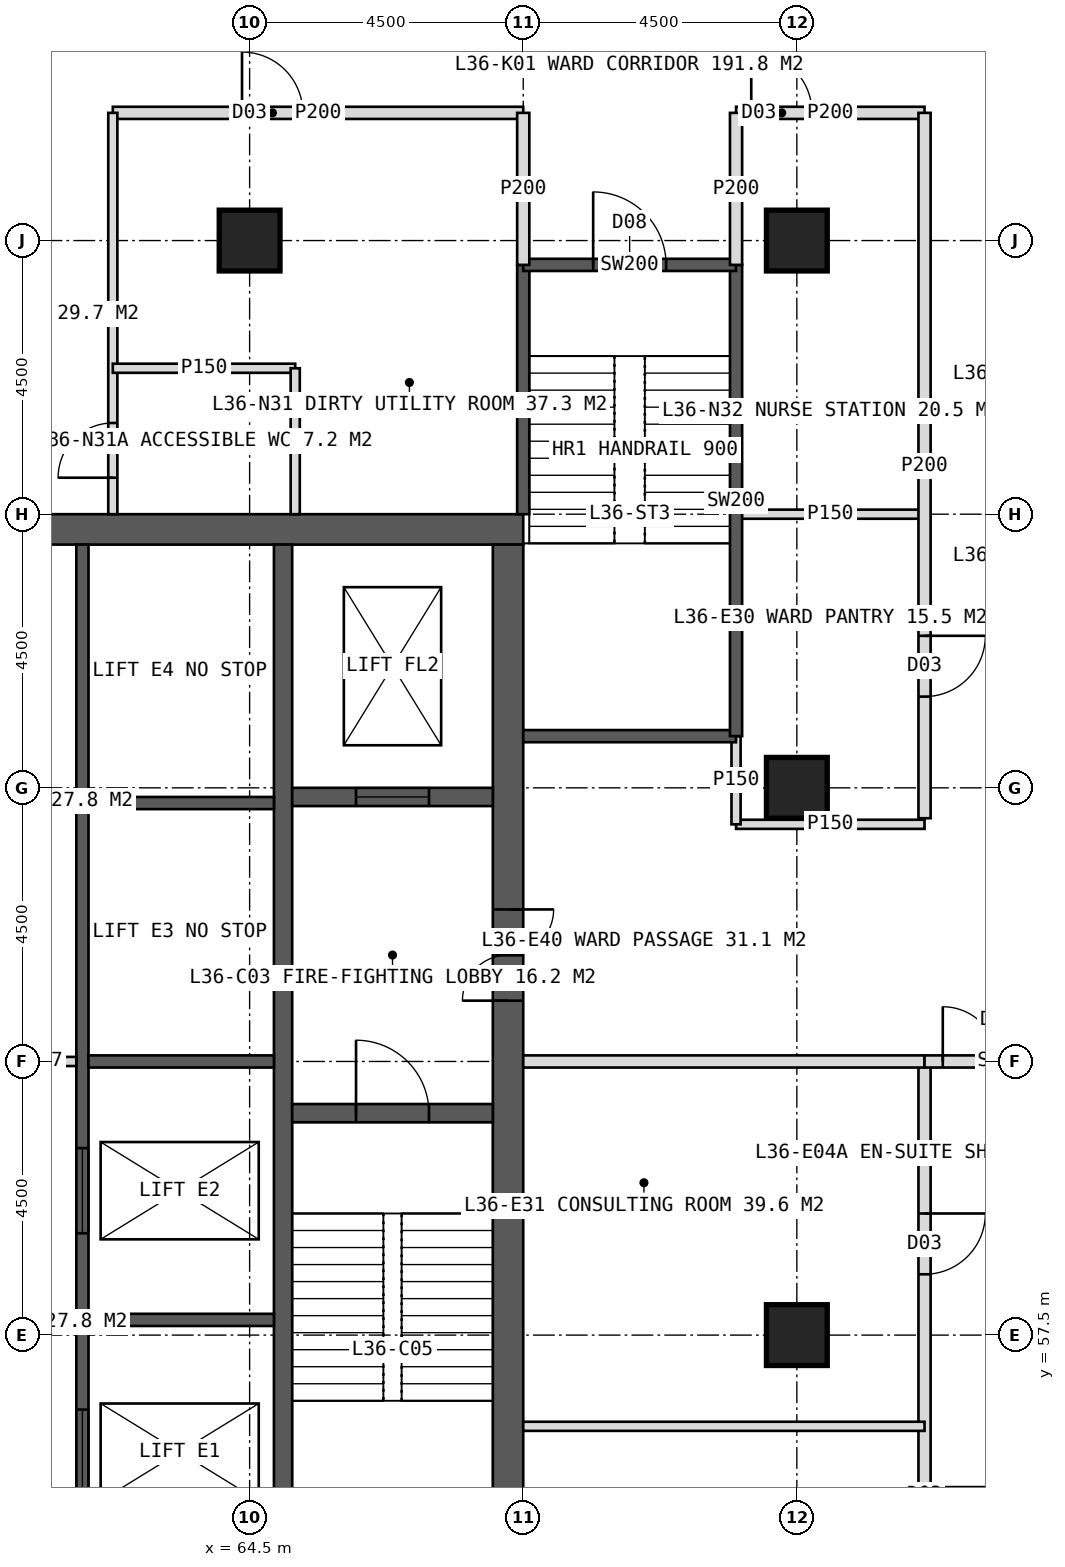
"""IFC4 building model, lengths in metres.
Left out: names, types, materials, properties, quantities, classifications, styles, units other than length and angle.
Written with IfcOpenShell. Run it as: python <this file> out.ifc"""

import sys

from ifc_helpers import new_model, si_unit, direction, frame, frame_2d, origin, origin_2d, place, context, subcontext, project, spatial, rectangle, hollow_rectangle, extrude, element, fill, save


model = new_model("IFC4")
c1 = context("Model", 3, precision=1e-05, world=origin(), true_north=direction((0.0, 1.0)))
c2 = subcontext(c1, "Body", "Model", "MODEL_VIEW")
j1 = project(units=[si_unit("LENGTHUNIT", "METRE"), si_unit("PLANEANGLEUNIT", "RADIAN")], contexts=[c1])
p1 = place(None, origin())
s1 = spatial("IfcSite", under=j1, at=p1, CompositionType="ELEMENT")
p2 = place(p1, origin())
s2 = spatial("IfcBuilding", under=s1, at=p2, CompositionType="ELEMENT")
p3 = place(p2, frame((0.0, 0.0, 152.0)))
s3 = spatial("IfcBuildingStorey", under=s2, at=p3, CompositionType="ELEMENT", Elevation=152.0)
p4 = place(p3, frame((51.0, 70.75, 0.0), z_axis=(0.0, 0.0, 1.0), x_axis=(1.0, 0.0, 0.0)))
e1 = element("IfcWall", 1, at=p4, inside=s3, PredefinedType="SHEAR", context=c2, shape_type="SweptSolid", body=[
    extrude(rectangle(XDim=18.0, YDim=0.5, at=frame_2d((9.0, 0.0))), origin(), (0.0, 0.0, 1.0), 4.0),
])
p5 = place(p4, frame((8.1, 0.0, 0.0)))
e2 = element("IfcOpeningElement", 2, at=p5, cuts=e1, PredefinedType="OPENING", context=c2, shape_type="SweptSolid", body=[
    extrude(rectangle(XDim=1.8, YDim=2.2, at=frame_2d((0.9, 1.1))), frame((0.0, 0.26, 0.0), z_axis=(0.0, -1.0, 0.0), x_axis=(1.0, 0.0, 0.0)), (0.0, 0.0, 1.0), 0.52),
])
p6 = place(p3, frame((68.75, 53.5, 0.0), z_axis=(0.0, 0.0, 1.0), x_axis=(0.0, 1.0, 0.0)))
e3 = element("IfcWall", 3, at=p6, inside=s3, PredefinedType="SHEAR", context=c2, shape_type="SweptSolid", body=[
    extrude(rectangle(XDim=17.0, YDim=0.5, at=frame_2d((8.5, 0.0))), origin(), (0.0, 0.0, 1.0), 4.0),
])
p7 = place(p6, frame((9.5, 0.0, 0.0)))
e4 = element("IfcOpeningElement", 4, at=p7, cuts=e3, PredefinedType="OPENING", context=c2, shape_type="SweptSolid", body=[
    extrude(rectangle(XDim=1.5, YDim=2.2, at=frame_2d((0.75, 1.1))), frame((0.0, 0.26, 0.0), z_axis=(0.0, -1.0, 0.0), x_axis=(1.0, 0.0, 0.0)), (0.0, 0.0, 1.0), 0.52),
])
p8 = place(p3, frame((65.05, 53.5, 0.0), z_axis=(0.0, 0.0, 1.0), x_axis=(0.0, 1.0, 0.0)))
e5 = element("IfcWall", 5, at=p8, inside=s3, PredefinedType="SHEAR", context=c2, shape_type="SweptSolid", body=[
    extrude(rectangle(XDim=17.0, YDim=0.3, at=frame_2d((8.5, 0.0))), origin(), (0.0, 0.0, 1.0), 4.0),
])
p9 = place(p3, frame((61.75, 53.5, 0.0), z_axis=(0.0, 0.0, 1.0), x_axis=(0.0, 1.0, 0.0)))
e6 = element("IfcWall", 6, at=p9, inside=s3, PredefinedType="SHEAR", context=c2, shape_type="SweptSolid", body=[
    extrude(rectangle(XDim=17.0, YDim=0.2, at=frame_2d((8.5, 0.0))), origin(), (0.0, 0.0, 1.0), 4.0),
])
p10 = place(p9, frame((1.375, 0.0, 0.0)))
e7 = element("IfcOpeningElement", 7, at=p10, cuts=e6, PredefinedType="OPENING", context=c2, shape_type="SweptSolid", body=[
    extrude(rectangle(XDim=1.4, YDim=2.2, at=frame_2d((0.7, 1.1))), frame((0.0, 0.11, 0.0), z_axis=(0.0, -1.0, 0.0), x_axis=(1.0, 0.0, 0.0)), (0.0, 0.0, 1.0), 0.22),
])
p11 = place(p9, frame((5.675, 0.0, 0.0)))
e8 = element("IfcOpeningElement", 8, at=p11, cuts=e6, PredefinedType="OPENING", context=c2, shape_type="SweptSolid", body=[
    extrude(rectangle(XDim=1.4, YDim=2.2, at=frame_2d((0.7, 1.1))), frame((0.0, 0.11, 0.0), z_axis=(0.0, -1.0, 0.0), x_axis=(1.0, 0.0, 0.0)), (0.0, 0.0, 1.0), 0.22),
])
for number, where, z_axis, x_axis in (
    (9, (61.85, 57.75, 0.0), (0.0, 0.0, 1.0), (1.0, 0.0, 0.0)),
    (10, (61.85, 62.0, 0.0), (0.0, 0.0, 1.0), (1.0, 0.0, 0.0)),
    (11, (61.85, 66.25, 0.0), (0.0, 0.0, 1.0), (1.0, 0.0, 0.0)),
):
    element("IfcWall", number, at=place(p3, frame(where, z_axis=z_axis, x_axis=x_axis)), inside=s3, PredefinedType="SHEAR", context=c2, shape_type="SweptSolid", body=[
        extrude(rectangle(XDim=3.05, YDim=0.2, at=frame_2d((1.525, 0.0))), origin(), (0.0, 0.0, 1.0), 4.0),
    ])
p12 = place(p3, frame((65.2, 61.15, 0.0), z_axis=(0.0, 0.0, 1.0), x_axis=(1.0, 0.0, 0.0)))
e12 = element("IfcWall", 12, at=p12, inside=s3, PredefinedType="SHEAR", context=c2, shape_type="SweptSolid", body=[
    extrude(rectangle(XDim=3.3, YDim=0.3, at=frame_2d((1.65, 0.0))), origin(), (0.0, 0.0, 1.0), 4.0),
])
p13 = place(p12, frame((1.05, 0.0, 0.0)))
e13 = element("IfcOpeningElement", 13, at=p13, cuts=e12, PredefinedType="OPENING", context=c2, shape_type="SweptSolid", body=[
    extrude(rectangle(XDim=1.2, YDim=2.1, at=frame_2d((0.6, 1.05))), frame((0.0, 0.16, 0.0), z_axis=(0.0, -1.0, 0.0), x_axis=(1.0, 0.0, 0.0)), (0.0, 0.0, 1.0), 0.32),
])
p14 = place(p3, frame((65.2, 66.35, 0.0), z_axis=(0.0, 0.0, 1.0), x_axis=(1.0, 0.0, 0.0)))
e14 = element("IfcWall", 14, at=p14, inside=s3, PredefinedType="SHEAR", context=c2, shape_type="SweptSolid", body=[
    extrude(rectangle(XDim=3.3, YDim=0.3, at=frame_2d((1.65, 0.0))), origin(), (0.0, 0.0, 1.0), 4.0),
])
p15 = place(p14, frame((1.05, 0.0, 0.0)))
e15 = element("IfcOpeningElement", 15, at=p15, cuts=e14, PredefinedType="OPENING", context=c2, shape_type="SweptSolid", body=[
    extrude(rectangle(XDim=1.2, YDim=2.2, at=frame_2d((0.6, 1.1))), frame((0.0, 0.16, 0.0), z_axis=(0.0, -1.0, 0.0), x_axis=(1.0, 0.0, 0.0)), (0.0, 0.0, 1.0), 0.32),
])
for number, where, z_axis, x_axis in (
    (16, (73.5, 75.5, 0.0), (0.0, 0.0, 1.0), (1.0, 0.0, 0.0)),
    (17, (64.5, 75.5, 0.0), (0.0, 0.0, 1.0), (1.0, 0.0, 0.0)),
    (18, (73.5, 57.5, 0.0), (0.0, 0.0, 1.0), (1.0, 0.0, 0.0)),
    (19, (73.5, 66.5, 0.0), (0.0, 0.0, 1.0), (1.0, 0.0, 0.0)),
):
    element("IfcColumn", number, at=place(p3, frame(where, z_axis=z_axis, x_axis=x_axis)), inside=s3, PredefinedType="COLUMN", context=c2, shape_type="SweptSolid", body=[
        extrude(hollow_rectangle(XDim=1.0, YDim=1.0, WallThickness=0.1, at=origin_2d()), origin(), (0.0, 0.0, 1.0), 4.0),
    ])
p16 = place(p3, frame((62.25, 77.6, 0.0), z_axis=(0.0, 0.0, 1.0), x_axis=(1.0, 0.0, 0.0)))
e20 = element("IfcWall", 20, at=p16, inside=s3, PredefinedType="PARTITIONING", context=c2, shape_type="SweptSolid", body=[
    extrude(rectangle(XDim=6.75, YDim=0.2, at=frame_2d((3.375, 0.0))), origin(), (0.0, 0.0, 1.0), 3.75),
])
p17 = place(p16, frame((2.125, 0.0, 0.0)))
e21 = element("IfcOpeningElement", 21, at=p17, cuts=e20, PredefinedType="OPENING", context=c2, shape_type="SweptSolid", body=[
    extrude(rectangle(XDim=1.0, YDim=2.1, at=frame_2d((0.5, 1.05))), frame((0.0, 0.11, 0.0), z_axis=(0.0, -1.0, 0.0), x_axis=(1.0, 0.0, 0.0)), (0.0, 0.0, 1.0), 0.22),
])
p18 = place(p3, frame((72.5, 77.6, 0.0), z_axis=(0.0, 0.0, 1.0), x_axis=(1.0, 0.0, 0.0)))
e22 = element("IfcWall", 22, at=p18, inside=s3, PredefinedType="PARTITIONING", context=c2, shape_type="SweptSolid", body=[
    extrude(rectangle(XDim=3.1, YDim=0.2, at=frame_2d((1.55, 0.0))), origin(), (0.0, 0.0, 1.0), 3.75),
])
p19 = place(p18, frame((0.25, 0.0, 0.0)))
e23 = element("IfcOpeningElement", 23, at=p19, cuts=e22, PredefinedType="OPENING", context=c2, shape_type="SweptSolid", body=[
    extrude(rectangle(XDim=1.0, YDim=2.1, at=frame_2d((0.5, 1.05))), frame((0.0, 0.11, 0.0), z_axis=(0.0, -1.0, 0.0), x_axis=(1.0, 0.0, 0.0)), (0.0, 0.0, 1.0), 0.22),
])
p20 = place(p3, frame((62.25, 71.0, 0.0), z_axis=(0.0, 0.0, 1.0), x_axis=(0.0, 1.0, 0.0)))
e24 = element("IfcWall", 24, at=p20, inside=s3, PredefinedType="PARTITIONING", context=c2, shape_type="SweptSolid", body=[
    extrude(rectangle(XDim=6.6, YDim=0.15, at=frame_2d((3.3, 0.0))), origin(), (0.0, 0.0, 1.0), 3.75),
])
p21 = place(p20, frame((0.6, 0.0, 0.0)))
e25 = element("IfcOpeningElement", 25, at=p21, cuts=e24, PredefinedType="OPENING", context=c2, shape_type="SweptSolid", body=[
    extrude(rectangle(XDim=0.9, YDim=2.1, at=frame_2d((0.45, 1.05))), frame((0.0, 0.085, 0.0), z_axis=(0.0, -1.0, 0.0), x_axis=(1.0, 0.0, 0.0)), (0.0, 0.0, 1.0), 0.17),
])
p22 = place(p3, frame((62.25, 73.4, 0.0), z_axis=(0.0, 0.0, 1.0), x_axis=(1.0, 0.0, 0.0)))
e26 = element("IfcWall", 26, at=p22, inside=s3, PredefinedType="PARTITIONING", context=c2, shape_type="SweptSolid", body=[
    extrude(rectangle(XDim=3.0, YDim=0.15, at=frame_2d((1.5, 0.0))), origin(), (0.0, 0.0, 1.0), 3.75),
])
p23 = place(p3, frame((65.25, 71.0, 0.0), z_axis=(0.0, 0.0, 1.0), x_axis=(0.0, 1.0, 0.0)))
e27 = element("IfcWall", 27, at=p23, inside=s3, PredefinedType="PARTITIONING", context=c2, shape_type="SweptSolid", body=[
    extrude(rectangle(XDim=2.4, YDim=0.15, at=frame_2d((1.2, 0.0))), origin(), (0.0, 0.0, 1.0), 3.75),
])
p24 = place(p3, frame((72.5, 71.0, 0.0), z_axis=(0.0, 0.0, 1.0), x_axis=(1.0, 0.0, 0.0)))
e28 = element("IfcWall", 28, at=p24, inside=s3, PredefinedType="PARTITIONING", context=c2, shape_type="SweptSolid", body=[
    extrude(rectangle(XDim=3.1, YDim=0.15, at=frame_2d((1.55, 0.0))), origin(), (0.0, 0.0, 1.0), 3.75),
])
p25 = place(p3, frame((75.6, 77.6, 0.0), z_axis=(0.0, 0.0, 1.0), x_axis=(0.0, -1.0, 0.0)))
e29 = element("IfcWall", 29, at=p25, inside=s3, PredefinedType="PARTITIONING", context=c2, shape_type="SweptSolid", body=[
    extrude(rectangle(XDim=11.6, YDim=0.2, at=frame_2d((5.8, 0.0))), origin(), (0.0, 0.0, 1.0), 3.75),
])
p26 = place(p25, frame((8.6, 0.0, 0.0)))
e30 = element("IfcOpeningElement", 30, at=p26, cuts=e29, PredefinedType="OPENING", context=c2, shape_type="SweptSolid", body=[
    extrude(rectangle(XDim=1.0, YDim=2.1, at=frame_2d((0.5, 1.05))), frame((0.0, 0.11, 0.0), z_axis=(0.0, -1.0, 0.0), x_axis=(1.0, 0.0, 0.0)), (0.0, 0.0, 1.0), 0.22),
])
p27 = place(p3, frame((75.6, 62.0, 0.0), z_axis=(0.0, 0.0, 1.0), x_axis=(0.0, -1.0, 0.0)))
e31 = element("IfcWall", 31, at=p27, inside=s3, PredefinedType="PARTITIONING", context=c2, shape_type="SweptSolid", body=[
    extrude(rectangle(XDim=15.6, YDim=0.2, at=frame_2d((7.8, 0.0))), origin(), (0.0, 0.0, 1.0), 3.75),
])
p28 = place(p27, frame((2.5, 0.0, 0.0)))
e32 = element("IfcOpeningElement", 32, at=p28, cuts=e31, PredefinedType="OPENING", context=c2, shape_type="SweptSolid", body=[
    extrude(rectangle(XDim=1.0, YDim=2.1, at=frame_2d((0.5, 1.05))), frame((0.0, 0.11, 0.0), z_axis=(0.0, -1.0, 0.0), x_axis=(1.0, 0.0, 0.0)), (0.0, 0.0, 1.0), 0.22),
])
p29 = place(p27, frame((7.0, 0.0, 0.0)))
e33 = element("IfcOpeningElement", 33, at=p29, cuts=e31, PredefinedType="OPENING", context=c2, shape_type="SweptSolid", body=[
    extrude(rectangle(XDim=1.0, YDim=2.1, at=frame_2d((0.5, 1.05))), frame((0.0, 0.11, 0.0), z_axis=(0.0, -1.0, 0.0), x_axis=(1.0, 0.0, 0.0)), (0.0, 0.0, 1.0), 0.22),
])
p30 = place(p27, frame((11.8, 0.0, 0.0)))
e34 = element("IfcOpeningElement", 34, at=p30, cuts=e31, PredefinedType="OPENING", context=c2, shape_type="SweptSolid", body=[
    extrude(rectangle(XDim=1.0, YDim=2.1, at=frame_2d((0.5, 1.05))), frame((0.0, 0.11, 0.0), z_axis=(0.0, -1.0, 0.0), x_axis=(1.0, 0.0, 0.0)), (0.0, 0.0, 1.0), 0.22),
])
p31 = place(p3, frame((72.5, 65.9, 0.0), z_axis=(0.0, 0.0, 1.0), x_axis=(1.0, 0.0, 0.0)))
e35 = element("IfcWall", 35, at=p31, inside=s3, PredefinedType="PARTITIONING", context=c2, shape_type="SweptSolid", body=[
    extrude(rectangle(XDim=3.1, YDim=0.15, at=frame_2d((1.55, 0.0))), origin(), (0.0, 0.0, 1.0), 3.75),
])
p32 = place(p3, frame((69.0, 62.0, 0.0), z_axis=(0.0, 0.0, 1.0), x_axis=(1.0, 0.0, 0.0)))
e36 = element("IfcWall", 36, at=p32, inside=s3, PredefinedType="SOLIDWALL", context=c2, shape_type="SweptSolid", body=[
    extrude(rectangle(XDim=6.6, YDim=0.2, at=frame_2d((3.3, 0.0))), origin(), (0.0, 0.0, 1.0), 2.95),
])
p33 = place(p3, frame((69.0, 56.0, 0.0), z_axis=(0.0, 0.0, 1.0), x_axis=(1.0, 0.0, 0.0)))
e37 = element("IfcWall", 37, at=p33, inside=s3, PredefinedType="PARTITIONING", context=c2, shape_type="SweptSolid", body=[
    extrude(rectangle(XDim=6.6, YDim=0.15, at=frame_2d((3.3, 0.0))), origin(), (0.0, 0.0, 1.0), 3.75),
])
p34 = place(p3, frame((75.6, 62.0, 0.0), z_axis=(0.0, 0.0, 1.0), x_axis=(1.0, 0.0, 0.0)))
e38 = element("IfcWall", 38, at=p34, inside=s3, PredefinedType="SOLIDWALL", context=c2, shape_type="SweptSolid", body=[
    extrude(rectangle(XDim=2.7, YDim=0.2, at=frame_2d((1.35, 0.0))), origin(), (0.0, 0.0, 1.0), 2.95),
])
p35 = place(p34, frame((0.3, 0.0, 0.0)))
e39 = element("IfcOpeningElement", 39, at=p35, cuts=e38, PredefinedType="OPENING", context=c2, shape_type="SweptSolid", body=[
    extrude(rectangle(XDim=1.8, YDim=2.2, at=frame_2d((0.9, 1.1))), frame((0.0, 0.11, 0.0), z_axis=(0.0, -1.0, 0.0), x_axis=(1.0, 0.0, 0.0)), (0.0, 0.0, 1.0), 0.22),
])
p36 = place(p3, frame((58.35, 62.0, 0.0), z_axis=(0.0, 0.0, 1.0), x_axis=(1.0, 0.0, 0.0)))
e40 = element("IfcWall", 40, at=p36, inside=s3, PredefinedType="PARTITIONING", context=c2, shape_type="SweptSolid", body=[
    extrude(rectangle(XDim=3.3, YDim=0.15, at=frame_2d((1.65, 0.0))), origin(), (0.0, 0.0, 1.0), 3.75),
])
p37 = place(p36, frame((1.15, 0.0, 0.0)))
e41 = element("IfcOpeningElement", 41, at=p37, cuts=e40, PredefinedType="OPENING", context=c2, shape_type="SweptSolid", body=[
    extrude(rectangle(XDim=1.0, YDim=2.1, at=frame_2d((0.5, 1.05))), frame((0.0, 0.085, 0.0), z_axis=(0.0, -1.0, 0.0), x_axis=(1.0, 0.0, 0.0)), (0.0, 0.0, 1.0), 0.17),
])
p38 = place(p3, frame((72.5, 65.9, 0.0), z_axis=(0.0, 0.0, 1.0), x_axis=(0.0, 1.0, 0.0)))
e42 = element("IfcWall", 42, at=p38, inside=s3, PredefinedType="PARTITIONING", context=c2, shape_type="SweptSolid", body=[
    extrude(rectangle(XDim=1.45, YDim=0.15, at=frame_2d((0.725, 0.0))), origin(), (0.0, 0.0, 1.0), 3.75),
])
p39 = place(p3, frame((69.0, 71.0, 0.0), z_axis=(0.0, 0.0, 1.0), x_axis=(0.0, 1.0, 0.0)))
e43 = element("IfcWall", 43, at=p39, inside=s3, PredefinedType="SOLIDWALL", context=c2, shape_type="SweptSolid", body=[
    extrude(rectangle(XDim=4.1, YDim=0.2, at=frame_2d((2.05, 0.0))), origin(), (0.0, 0.0, 1.0), 3.75),
])
p40 = place(p3, frame((69.0, 67.35, 0.0), z_axis=(0.0, 0.0, 1.0), x_axis=(1.0, 0.0, 0.0)))
e44 = element("IfcWall", 44, at=p40, inside=s3, PredefinedType="SOLIDWALL", context=c2, shape_type="SweptSolid", body=[
    extrude(rectangle(XDim=3.5, YDim=0.2, at=frame_2d((1.75, 0.0))), origin(), (0.0, 0.0, 1.0), 3.75),
])
p41 = place(p3, frame((72.5, 67.35, 0.0), z_axis=(0.0, 0.0, 1.0), x_axis=(0.0, 1.0, 0.0)))
e45 = element("IfcWall", 45, at=p41, inside=s3, PredefinedType="SOLIDWALL", context=c2, shape_type="SweptSolid", body=[
    extrude(rectangle(XDim=7.75, YDim=0.2, at=frame_2d((3.875, 0.0))), origin(), (0.0, 0.0, 1.0), 3.75),
])
p42 = place(p3, frame((69.0, 75.1, 0.0), z_axis=(0.0, 0.0, 1.0), x_axis=(1.0, 0.0, 0.0)))
e46 = element("IfcWall", 46, at=p42, inside=s3, PredefinedType="SOLIDWALL", context=c2, shape_type="SweptSolid", body=[
    extrude(rectangle(XDim=3.5, YDim=0.2, at=frame_2d((1.75, 0.0))), origin(), (0.0, 0.0, 1.0), 3.75),
])
p43 = place(p42, frame((1.15, 0.0, 0.0)))
e47 = element("IfcOpeningElement", 47, at=p43, cuts=e46, PredefinedType="OPENING", context=c2, shape_type="SweptSolid", body=[
    extrude(rectangle(XDim=1.2, YDim=2.1, at=frame_2d((0.6, 1.05))), frame((0.0, 0.11, 0.0), z_axis=(0.0, -1.0, 0.0), x_axis=(1.0, 0.0, 0.0)), (0.0, 0.0, 1.0), 0.22),
])
for number, where, z_axis, x_axis in (
    (48, (69.0, 75.1, 0.0), (0.0, 0.0, 1.0), (0.0, 1.0, 0.0)),
    (49, (72.5, 75.1, 0.0), (0.0, 0.0, 1.0), (0.0, 1.0, 0.0)),
):
    element("IfcWall", number, at=place(p3, frame(where, z_axis=z_axis, x_axis=x_axis)), inside=s3, PredefinedType="PARTITIONING", context=c2, shape_type="SweptSolid", body=[
        extrude(rectangle(XDim=2.5, YDim=0.2, at=frame_2d((1.25, 0.0))), origin(), (0.0, 0.0, 1.0), 3.75),
    ])
p44 = place(p21, origin())
e50 = element("IfcDoor", 50, at=p44, inside=s3, OperationType="SINGLE_SWING_LEFT", PredefinedType="DOOR", context=c2, shape_type="SweptSolid", body=[
    extrude(rectangle(XDim=0.9, YDim=2.1, at=frame_2d((0.45, 1.05))), frame((0.0, 0.025, 0.0), z_axis=(0.0, -1.0, 0.0), x_axis=(1.0, 0.0, 0.0)), (0.0, 0.0, 1.0), 0.05),
])
fill(e25, e50)
p45 = place(p17, origin())
e51 = element("IfcDoor", 51, at=p45, inside=s3, OperationType="SINGLE_SWING_LEFT", PredefinedType="DOOR", context=c2, shape_type="SweptSolid", body=[
    extrude(rectangle(XDim=1.0, YDim=2.1, at=frame_2d((0.5, 1.05))), frame((0.0, 0.025, 0.0), z_axis=(0.0, -1.0, 0.0), x_axis=(1.0, 0.0, 0.0)), (0.0, 0.0, 1.0), 0.05),
])
fill(e21, e51)
p46 = place(p19, origin())
e52 = element("IfcDoor", 52, at=p46, inside=s3, OperationType="SINGLE_SWING_LEFT", PredefinedType="DOOR", context=c2, shape_type="SweptSolid", body=[
    extrude(rectangle(XDim=1.0, YDim=2.1, at=frame_2d((0.5, 1.05))), frame((0.0, 0.025, 0.0), z_axis=(0.0, -1.0, 0.0), x_axis=(1.0, 0.0, 0.0)), (0.0, 0.0, 1.0), 0.05),
])
fill(e23, e52)
p47 = place(p26, origin())
e53 = element("IfcDoor", 53, at=p47, inside=s3, OperationType="SINGLE_SWING_LEFT", PredefinedType="DOOR", context=c2, shape_type="SweptSolid", body=[
    extrude(rectangle(XDim=1.0, YDim=2.1, at=frame_2d((0.5, 1.05))), frame((0.0, 0.025, 0.0), z_axis=(0.0, -1.0, 0.0), x_axis=(1.0, 0.0, 0.0)), (0.0, 0.0, 1.0), 0.05),
])
fill(e30, e53)
p48 = place(p28, origin())
e54 = element("IfcDoor", 54, at=p48, inside=s3, OperationType="SINGLE_SWING_LEFT", PredefinedType="DOOR", context=c2, shape_type="SweptSolid", body=[
    extrude(rectangle(XDim=1.0, YDim=2.1, at=frame_2d((0.5, 1.05))), frame((0.0, 0.025, 0.0), z_axis=(0.0, -1.0, 0.0), x_axis=(1.0, 0.0, 0.0)), (0.0, 0.0, 1.0), 0.05),
])
fill(e32, e54)
p49 = place(p35, origin())
e55 = element("IfcDoor", 55, at=p49, inside=s3, OperationType="DOUBLE_DOOR_DOUBLE_SWING", PredefinedType="DOOR", context=c2, shape_type="SweptSolid", body=[
    extrude(rectangle(XDim=1.8, YDim=2.2, at=frame_2d((0.9, 1.1))), frame((0.0, 0.025, 0.0), z_axis=(0.0, -1.0, 0.0), x_axis=(1.0, 0.0, 0.0)), (0.0, 0.0, 1.0), 0.05),
])
fill(e39, e55)
p50 = place(p7, origin())
e56 = element("IfcDoor", 56, at=p50, inside=s3, OperationType="DOUBLE_DOOR_SINGLE_SWING", PredefinedType="DOOR", context=c2, shape_type="SweptSolid", body=[
    extrude(rectangle(XDim=1.5, YDim=2.2, at=frame_2d((0.75, 1.1))), frame((0.0, 0.025, 0.0), z_axis=(0.0, -1.0, 0.0), x_axis=(1.0, 0.0, 0.0)), (0.0, 0.0, 1.0), 0.05),
])
fill(e4, e56)
p51 = place(p13, origin())
e57 = element("IfcDoor", 57, at=p51, inside=s3, OperationType="SINGLE_SWING_LEFT", PredefinedType="DOOR", context=c2, shape_type="SweptSolid", body=[
    extrude(rectangle(XDim=1.2, YDim=2.1, at=frame_2d((0.6, 1.05))), frame((0.0, 0.025, 0.0), z_axis=(0.0, -1.0, 0.0), x_axis=(1.0, 0.0, 0.0)), (0.0, 0.0, 1.0), 0.05),
])
fill(e13, e57)
p52 = place(p15, origin())
e58 = element("IfcDoor", 58, at=p52, inside=s3, OperationType="SLIDING_TO_LEFT", PredefinedType="DOOR", context=c2, shape_type="SweptSolid", body=[
    extrude(rectangle(XDim=1.2, YDim=2.2, at=frame_2d((0.6, 1.1))), frame((0.0, 0.025, 0.0), z_axis=(0.0, -1.0, 0.0), x_axis=(1.0, 0.0, 0.0)), (0.0, 0.0, 1.0), 0.05),
])
fill(e15, e58)
p53 = place(p10, origin())
e59 = element("IfcDoor", 59, at=p53, inside=s3, OperationType="SLIDING_TO_LEFT", PredefinedType="DOOR", context=c2, shape_type="SweptSolid", body=[
    extrude(rectangle(XDim=1.4, YDim=2.2, at=frame_2d((0.7, 1.1))), frame((0.0, 0.025, 0.0), z_axis=(0.0, -1.0, 0.0), x_axis=(1.0, 0.0, 0.0)), (0.0, 0.0, 1.0), 0.05),
])
fill(e7, e59)
p54 = place(p11, origin())
e60 = element("IfcDoor", 60, at=p54, inside=s3, OperationType="SLIDING_TO_LEFT", PredefinedType="DOOR", context=c2, shape_type="SweptSolid", body=[
    extrude(rectangle(XDim=1.4, YDim=2.2, at=frame_2d((0.7, 1.1))), frame((0.0, 0.025, 0.0), z_axis=(0.0, -1.0, 0.0), x_axis=(1.0, 0.0, 0.0)), (0.0, 0.0, 1.0), 0.05),
])
fill(e8, e60)
p55 = place(p43, origin())
e61 = element("IfcDoor", 61, at=p55, inside=s3, OperationType="SINGLE_SWING_LEFT", PredefinedType="DOOR", context=c2, shape_type="SweptSolid", body=[
    extrude(rectangle(XDim=1.2, YDim=2.1, at=frame_2d((0.6, 1.05))), frame((0.0, 0.025, 0.0), z_axis=(0.0, -1.0, 0.0), x_axis=(1.0, 0.0, 0.0)), (0.0, 0.0, 1.0), 0.05),
])
fill(e47, e61)
save(model, sys.argv[1])
